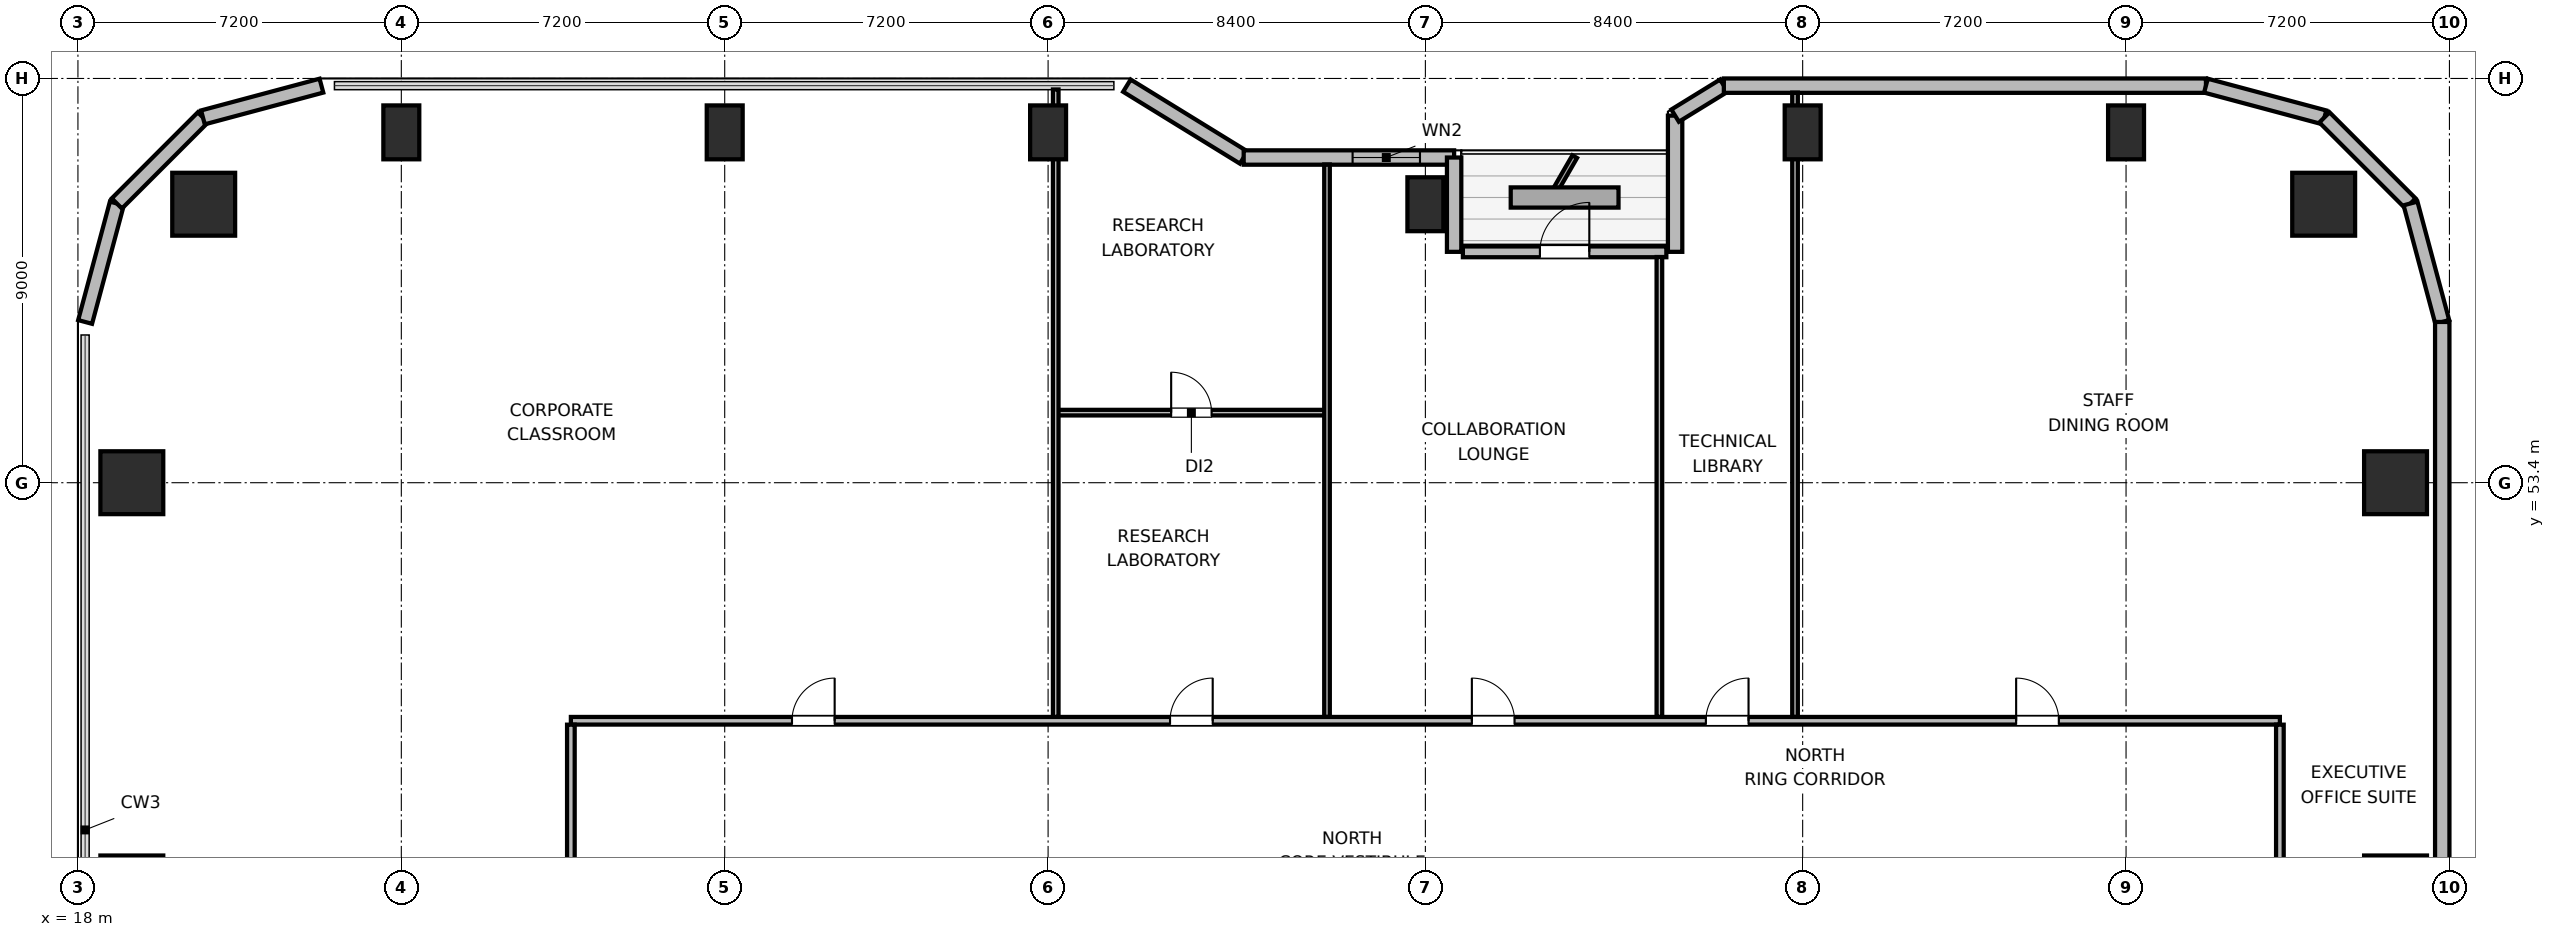
"""IFC4 building model, lengths in metres.
Left out: names, types, materials, properties, quantities, classifications, styles, units other than length and angle.
Written with IfcOpenShell. Run it as: python <this file> out.ifc"""

import sys

from ifc_helpers import new_model, si_unit, direction, frame, frame_2d, origin, origin_2d, place, context, subcontext, project, spatial, rectangle, circle, extrude, element, fill, save


model = new_model("IFC4")
c1 = context("Model", 3, precision=1e-05, world=origin(), true_north=direction((0.0, 1.0)))
c2 = subcontext(c1, "Body", "Model", "MODEL_VIEW")
j1 = project(units=[si_unit("LENGTHUNIT", "METRE"), si_unit("PLANEANGLEUNIT", "RADIAN")], contexts=[c1])
p1 = place(None, origin())
s1 = spatial("IfcSite", under=j1, at=p1, CompositionType="ELEMENT")
p2 = place(p1, origin())
s2 = spatial("IfcBuilding", under=s1, at=p2, CompositionType="ELEMENT")
p3 = place(p2, frame((0.0, 0.0, 105.3)))
s3 = spatial("IfcBuildingStorey", under=s2, at=p3, CompositionType="ELEMENT", Elevation=105.3)
for number, where, z_axis, x_axis in (
    (1, (68.0, 59.6, 0.0), (0.0, 0.0, 1.0), (1.0, 0.0, 0.0)),
    (2, (20.8, 59.6, 0.0), (0.0, 0.0, 1.0), (1.0, 0.0, 0.0)),
):
    element("IfcColumn", number, at=place(p3, frame(where, z_axis=z_axis, x_axis=x_axis)), inside=s3, PredefinedType="COLUMN", context=c2, shape_type="SweptSolid", body=[
        extrude(circle(Radius=0.7, at=origin_2d()), origin(), (0.0, 0.0, 1.0), 3.9),
    ])
for number, where, z_axis, x_axis in (
    (3, (25.2, 61.2, 0.0), (0.0, 0.0, 1.0), (1.0, 0.0, 0.0)),
    (4, (32.4, 61.2, 0.0), (0.0, 0.0, 1.0), (1.0, 0.0, 0.0)),
    (5, (39.6, 61.2, 0.0), (0.0, 0.0, 1.0), (1.0, 0.0, 0.0)),
    (6, (48.0, 59.6, 0.0), (0.0, 0.0, 1.0), (1.0, 0.0, 0.0)),
    (7, (56.4, 61.2, 0.0), (0.0, 0.0, 1.0), (1.0, 0.0, 0.0)),
    (8, (63.6, 61.2, 0.0), (0.0, 0.0, 1.0), (1.0, 0.0, 0.0)),
):
    element("IfcColumn", number, at=place(p3, frame(where, z_axis=z_axis, x_axis=x_axis)), inside=s3, PredefinedType="COLUMN", context=c2, shape_type="SweptSolid", body=[
        extrude(rectangle(XDim=0.8, YDim=1.2, at=origin_2d()), origin(), (0.0, 0.0, 1.0), 3.9),
    ])
for number, where, z_axis, x_axis in (
    (9, (19.2, 44.4, 0.0), (0.0, 0.0, 1.0), (1.0, 0.0, 0.0)),
    (10, (69.6, 44.4, 0.0), (0.0, 0.0, 1.0), (1.0, 0.0, 0.0)),
    (11, (19.2, 53.4, 0.0), (0.0, 0.0, 1.0), (1.0, 0.0, 0.0)),
    (12, (69.6, 53.4, 0.0), (0.0, 0.0, 1.0), (1.0, 0.0, 0.0)),
):
    element("IfcColumn", number, at=place(p3, frame(where, z_axis=z_axis, x_axis=x_axis)), inside=s3, PredefinedType="COLUMN", context=c2, shape_type="SweptSolid", body=[
        extrude(rectangle(XDim=1.4, YDim=1.4, at=origin_2d()), origin(), (0.0, 0.0, 1.0), 3.9),
    ])
p4 = place(p3, frame((18.16, 56.979, 0.0), z_axis=(0.0, 0.0, 1.0), x_axis=(0.25869736047, 0.965958423373, 0.0)))
e13 = element("IfcWall", 13, at=p4, inside=s3, PredefinedType="SOLIDWALL", context=c2, shape_type="SweptSolid", body=[
    extrude(rectangle(XDim=2.731, YDim=0.32, at=frame_2d((1.366, 0.0))), origin(), (0.0, 0.0, 1.0), 3.64),
])
p5 = place(p3, frame((18.866, 59.617, 0.0), z_axis=(0.0, 0.0, 1.0), x_axis=(0.707106781187, 0.707106781187, 0.0)))
e14 = element("IfcWall", 14, at=p5, inside=s3, PredefinedType="SOLIDWALL", context=c2, shape_type="SweptSolid", body=[
    extrude(rectangle(XDim=2.71, YDim=0.32, at=frame_2d((1.355, 0.0))), origin(), (0.0, 0.0, 1.0), 3.64),
])
p6 = place(p3, frame((20.783, 61.533, 0.0), z_axis=(0.0, 0.0, 1.0), x_axis=(0.965964405026, 0.25867502435, 0.0)))
e15 = element("IfcWall", 15, at=p6, inside=s3, PredefinedType="SOLIDWALL", context=c2, shape_type="SweptSolid", body=[
    extrude(rectangle(XDim=2.731, YDim=0.32, at=frame_2d((1.366, 0.0))), origin(), (0.0, 0.0, 1.0), 3.64),
])
p7 = place(p3, frame((41.355, 62.24, 0.0), z_axis=(0.0, 0.0, 1.0), x_axis=(0.851630857047, -0.524142044989, 0.0)))
e16 = element("IfcWall", 16, at=p7, inside=s3, PredefinedType="SOLIDWALL", context=c2, shape_type="SweptSolid", body=[
    extrude(rectangle(XDim=3.053, YDim=0.32, at=frame_2d((1.526, 0.0))), origin(), (0.0, 0.0, 1.0), 2.875),
])
p8 = place(p3, frame((43.955, 60.64, 0.0), z_axis=(0.0, 0.0, 1.0), x_axis=(1.0, 0.0, 0.0)))
e17 = element("IfcWall", 17, at=p8, inside=s3, PredefinedType="SOLIDWALL", context=c2, shape_type="SweptSolid", body=[
    extrude(rectangle(XDim=4.685, YDim=0.32, at=frame_2d((2.343, 0.0))), origin(), (0.0, 0.0, 1.0), 2.875),
])
p9 = place(p8, frame((2.425, 0.0, 0.85)))
e18 = element("IfcOpeningElement", 18, at=p9, cuts=e17, PredefinedType="OPENING", context=c2, shape_type="SweptSolid", body=[
    extrude(rectangle(XDim=1.5, YDim=1.1, at=frame_2d((0.75, 0.55))), frame((0.0, 0.17, 0.0), z_axis=(0.0, -1.0, 0.0), x_axis=(1.0, 0.0, 0.0)), (0.0, 0.0, 1.0), 0.34),
])
p10 = place(p3, frame((48.64, 60.64, 0.0), z_axis=(0.0, 0.0, 1.0), x_axis=(0.0, -1.0, 0.0)))
e19 = element("IfcWall", 19, at=p10, inside=s3, PredefinedType="SOLIDWALL", context=c2, shape_type="SweptSolid", body=[
    extrude(rectangle(XDim=2.1, YDim=0.32, at=frame_2d((1.05, 0.0))), origin(), (0.0, 0.0, 1.0), 2.875),
])
p11 = place(p3, frame((48.835, 58.54, 0.0), z_axis=(0.0, 0.0, 1.0), x_axis=(1.0, 0.0, 0.0)))
e20 = element("IfcWall", 20, at=p11, inside=s3, PredefinedType="SOLIDWALL", context=c2, shape_type="SweptSolid", body=[
    extrude(rectangle(XDim=4.53, YDim=0.24, at=frame_2d((2.265, 0.0))), origin(), (0.0, 0.0, 1.0), 3.64),
])
p12 = place(p11, frame((1.715, 0.0, 0.0)))
e21 = element("IfcOpeningElement", 21, at=p12, cuts=e20, PredefinedType="OPENING", context=c2, shape_type="SweptSolid", body=[
    extrude(rectangle(XDim=1.1, YDim=2.04, at=frame_2d((0.55, 1.02))), frame((0.0, 0.13, 0.0), z_axis=(0.0, -1.0, 0.0), x_axis=(1.0, 0.0, 0.0)), (0.0, 0.0, 1.0), 0.26),
])
p13 = place(p3, frame((53.56, 58.54, 0.0), z_axis=(0.0, 0.0, 1.0), x_axis=(0.0, 1.0, 0.0)))
e22 = element("IfcWall", 22, at=p13, inside=s3, PredefinedType="SOLIDWALL", context=c2, shape_type="SweptSolid", body=[
    extrude(rectangle(XDim=3.032, YDim=0.32, at=frame_2d((1.516, 0.0))), origin(), (0.0, 0.0, 1.0), 2.875),
])
p14 = place(p3, frame((53.56, 61.573, 0.0), z_axis=(0.0, 0.0, 1.0), x_axis=(0.851776724646, 0.523904964045, 0.0)))
e23 = element("IfcWall", 23, at=p14, inside=s3, PredefinedType="SOLIDWALL", context=c2, shape_type="SweptSolid", body=[
    extrude(rectangle(XDim=1.274, YDim=0.32, at=frame_2d((0.637, 0.0))), origin(), (0.0, 0.0, 1.0), 3.64),
])
p15 = place(p3, frame((54.645, 62.24, 0.0), z_axis=(0.0, 0.0, 1.0), x_axis=(1.0, 0.0, 0.0)))
e24 = element("IfcWall", 24, at=p15, inside=s3, PredefinedType="SOLIDWALL", context=c2, shape_type="SweptSolid", body=[
    extrude(rectangle(XDim=10.734, YDim=0.32, at=frame_2d((5.367, 0.0))), origin(), (0.0, 0.0, 1.0), 3.64),
])
p16 = place(p3, frame((65.379, 62.24, 0.0), z_axis=(0.0, 0.0, 1.0), x_axis=(0.965958423373, -0.25869736047, 0.0)))
e25 = element("IfcWall", 25, at=p16, inside=s3, PredefinedType="SOLIDWALL", context=c2, shape_type="SweptSolid", body=[
    extrude(rectangle(XDim=2.731, YDim=0.32, at=frame_2d((1.366, 0.0))), origin(), (0.0, 0.0, 1.0), 3.64),
])
p17 = place(p3, frame((68.017, 61.533, 0.0), z_axis=(0.0, 0.0, 1.0), x_axis=(0.707151821269, -0.707061738235, 0.0)))
e26 = element("IfcWall", 26, at=p17, inside=s3, PredefinedType="SOLIDWALL", context=c2, shape_type="SweptSolid", body=[
    extrude(rectangle(XDim=2.71, YDim=0.32, at=frame_2d((1.355, 0.0))), origin(), (0.0, 0.0, 1.0), 3.64),
])
p18 = place(p3, frame((69.934, 59.617, 0.0), z_axis=(0.0, 0.0, 1.0), x_axis=(0.258613949072, -0.965980758269, 0.0)))
e27 = element("IfcWall", 27, at=p18, inside=s3, PredefinedType="SOLIDWALL", context=c2, shape_type="SweptSolid", body=[
    extrude(rectangle(XDim=2.731, YDim=0.32, at=frame_2d((1.366, 0.0))), origin(), (0.0, 0.0, 1.0), 3.64),
])
p19 = place(p3, frame((70.64, 56.979, 0.0), z_axis=(0.0, 0.0, 1.0), x_axis=(0.0, -1.0, 0.0)))
e28 = element("IfcWall", 28, at=p19, inside=s3, PredefinedType="SOLIDWALL", context=c2, shape_type="SweptSolid", body=[
    extrude(rectangle(XDim=14.219, YDim=0.32, at=frame_2d((7.109, 0.0))), origin(), (0.0, 0.0, 1.0), 3.64),
])
p20 = place(p3, frame((28.975, 48.1, 0.0), z_axis=(0.0, 0.0, 1.0), x_axis=(1.0, 0.0, 0.0)))
e29 = element("IfcWall", 29, at=p20, inside=s3, PredefinedType="PARTITIONING", context=c2, shape_type="SweptSolid", body=[
    extrude(rectangle(XDim=38.05, YDim=0.17, at=frame_2d((19.025, 0.0))), origin(), (0.0, 0.0, 1.0), 3.64),
])
p21 = place(p20, frame((4.923, 0.0, 0.0)))
e30 = element("IfcOpeningElement", 30, at=p21, cuts=e29, PredefinedType="OPENING", context=c2, shape_type="SweptSolid", body=[
    extrude(rectangle(XDim=0.95, YDim=2.04, at=frame_2d((0.475, 1.02))), frame((0.0, 0.095, 0.0), z_axis=(0.0, -1.0, 0.0), x_axis=(1.0, 0.0, 0.0)), (0.0, 0.0, 1.0), 0.19),
])
p22 = place(p20, frame((13.34, 0.0, 0.0)))
e31 = element("IfcOpeningElement", 31, at=p22, cuts=e29, PredefinedType="OPENING", context=c2, shape_type="SweptSolid", body=[
    extrude(rectangle(XDim=0.95, YDim=2.04, at=frame_2d((0.475, 1.02))), frame((0.0, 0.095, 0.0), z_axis=(0.0, -1.0, 0.0), x_axis=(1.0, 0.0, 0.0)), (0.0, 0.0, 1.0), 0.19),
])
p23 = place(p20, frame((20.06, 0.0, 0.0)))
e32 = element("IfcOpeningElement", 32, at=p23, cuts=e29, PredefinedType="OPENING", context=c2, shape_type="SweptSolid", body=[
    extrude(rectangle(XDim=0.95, YDim=2.04, at=frame_2d((0.475, 1.02))), frame((0.0, 0.095, 0.0), z_axis=(0.0, -1.0, 0.0), x_axis=(1.0, 0.0, 0.0)), (0.0, 0.0, 1.0), 0.19),
])
p24 = place(p20, frame((25.27, 0.0, 0.0)))
e33 = element("IfcOpeningElement", 33, at=p24, cuts=e29, PredefinedType="OPENING", context=c2, shape_type="SweptSolid", body=[
    extrude(rectangle(XDim=0.95, YDim=2.04, at=frame_2d((0.475, 1.02))), frame((0.0, 0.095, 0.0), z_axis=(0.0, -1.0, 0.0), x_axis=(1.0, 0.0, 0.0)), (0.0, 0.0, 1.0), 0.19),
])
p25 = place(p20, frame((32.178, 0.0, 0.0)))
e34 = element("IfcOpeningElement", 34, at=p25, cuts=e29, PredefinedType="OPENING", context=c2, shape_type="SweptSolid", body=[
    extrude(rectangle(XDim=0.95, YDim=2.04, at=frame_2d((0.475, 1.02))), frame((0.0, 0.095, 0.0), z_axis=(0.0, -1.0, 0.0), x_axis=(1.0, 0.0, 0.0)), (0.0, 0.0, 1.0), 0.19),
])
p26 = place(p3, frame((28.975, 23.987, 0.0), z_axis=(0.0, 0.0, 1.0), x_axis=(0.0, 1.0, 0.0)))
e35 = element("IfcWall", 35, at=p26, inside=s3, PredefinedType="PARTITIONING", context=c2, shape_type="SweptSolid", body=[
    extrude(rectangle(XDim=24.026, YDim=0.17, at=frame_2d((12.013, 0.0))), origin(), (0.0, 0.0, 1.0), 3.64),
])
p27 = place(p26, frame((11.538, 0.0, 0.0)))
e36 = element("IfcOpeningElement", 36, at=p27, cuts=e35, PredefinedType="OPENING", context=c2, shape_type="SweptSolid", body=[
    extrude(rectangle(XDim=0.95, YDim=2.04, at=frame_2d((0.475, 1.02))), frame((0.0, 0.095, 0.0), z_axis=(0.0, -1.0, 0.0), x_axis=(1.0, 0.0, 0.0)), (0.0, 0.0, 1.0), 0.19),
])
p28 = place(p3, frame((67.025, 23.987, 0.0), z_axis=(0.0, 0.0, 1.0), x_axis=(0.0, 1.0, 0.0)))
e37 = element("IfcWall", 37, at=p28, inside=s3, PredefinedType="PARTITIONING", context=c2, shape_type="SweptSolid", body=[
    extrude(rectangle(XDim=24.026, YDim=0.17, at=frame_2d((12.013, 0.0))), origin(), (0.0, 0.0, 1.0), 3.64),
])
p29 = place(p28, frame((6.088, 0.0, 0.0)))
e38 = element("IfcOpeningElement", 38, at=p29, cuts=e37, PredefinedType="OPENING", context=c2, shape_type="SweptSolid", body=[
    extrude(rectangle(XDim=0.95, YDim=2.04, at=frame_2d((0.475, 1.02))), frame((0.0, 0.095, 0.0), z_axis=(0.0, -1.0, 0.0), x_axis=(1.0, 0.0, 0.0)), (0.0, 0.0, 1.0), 0.19),
])
p30 = place(p28, frame((18.188, 0.0, 0.0)))
e39 = element("IfcOpeningElement", 39, at=p30, cuts=e37, PredefinedType="OPENING", context=c2, shape_type="SweptSolid", body=[
    extrude(rectangle(XDim=0.95, YDim=2.04, at=frame_2d((0.475, 1.02))), frame((0.0, 0.095, 0.0), z_axis=(0.0, -1.0, 0.0), x_axis=(1.0, 0.0, 0.0)), (0.0, 0.0, 1.0), 0.19),
])
p31 = place(p3, frame((39.77, 54.96, 0.0), z_axis=(0.0, 0.0, 1.0), x_axis=(1.0, 0.0, 0.0)))
e40 = element("IfcWall", 40, at=p31, inside=s3, PredefinedType="PARTITIONING", context=c2, shape_type="SweptSolid", body=[
    extrude(rectangle(XDim=6.04, YDim=0.125, at=frame_2d((3.02, 0.0))), origin(), (0.0, 0.0, 1.0), 3.64),
])
p32 = place(p31, frame((2.57, 0.0, 0.0)))
e41 = element("IfcOpeningElement", 41, at=p32, cuts=e40, PredefinedType="OPENING", context=c2, shape_type="SweptSolid", body=[
    extrude(rectangle(XDim=0.9, YDim=2.02, at=frame_2d((0.45, 1.01))), frame((0.0, 0.073, 0.0), z_axis=(0.0, -1.0, 0.0), x_axis=(1.0, 0.0, 0.0)), (0.0, 0.0, 1.0), 0.145),
])
p33 = place(p3, frame((39.77, 48.187, 0.0), z_axis=(0.0, 0.0, 1.0), x_axis=(0.0, 1.0, 0.0)))
e42 = element("IfcWall", 42, at=p33, inside=s3, PredefinedType="PARTITIONING", context=c2, shape_type="SweptSolid", body=[
    extrude(rectangle(XDim=13.968, YDim=0.125, at=frame_2d((6.984, 0.0))), origin(), (0.0, 0.0, 1.0), 3.003),
])
p34 = place(p3, frame((45.81, 48.187, 0.0), z_axis=(0.0, 0.0, 1.0), x_axis=(0.0, 1.0, 0.0)))
e43 = element("IfcWall", 43, at=p34, inside=s3, PredefinedType="PARTITIONING", context=c2, shape_type="SweptSolid", body=[
    extrude(rectangle(XDim=12.298, YDim=0.125, at=frame_2d((6.149, 0.0))), origin(), (0.0, 0.0, 1.0), 3.64),
])
p35 = place(p3, frame((53.21, 48.187, 0.0), z_axis=(0.0, 0.0, 1.0), x_axis=(0.0, 1.0, 0.0)))
e44 = element("IfcWall", 44, at=p35, inside=s3, PredefinedType="PARTITIONING", context=c2, shape_type="SweptSolid", body=[
    extrude(rectangle(XDim=10.238, YDim=0.125, at=frame_2d((5.119, 0.0))), origin(), (0.0, 0.0, 1.0), 3.003),
])
p36 = place(p3, frame((56.23, 48.187, 0.0), z_axis=(0.0, 0.0, 1.0), x_axis=(0.0, 1.0, 0.0)))
e45 = element("IfcWall", 45, at=p36, inside=s3, PredefinedType="PARTITIONING", context=c2, shape_type="SweptSolid", body=[
    extrude(rectangle(XDim=13.898, YDim=0.125, at=frame_2d((6.949, 0.0))), origin(), (0.0, 0.0, 1.0), 3.003),
])
p37 = place(p9, origin())
e46 = element("IfcWindow", 46, at=p37, inside=s3, PartitioningType="SINGLE_PANEL", PredefinedType="WINDOW", context=c2, shape_type="SweptSolid", body=[
    extrude(rectangle(XDim=1.5, YDim=1.1, at=frame_2d((0.75, 0.55))), frame((0.0, 0.03, 0.0), z_axis=(0.0, -1.0, 0.0), x_axis=(1.0, 0.0, 0.0)), (0.0, 0.0, 1.0), 0.06),
])
fill(e18, e46)
p38 = place(p12, origin())
e47 = element("IfcDoor", 47, at=p38, inside=s3, OperationType="SINGLE_SWING_RIGHT", PredefinedType="DOOR", context=c2, shape_type="SweptSolid", body=[
    extrude(rectangle(XDim=1.1, YDim=2.04, at=frame_2d((0.55, 1.02))), frame((0.0, 0.025, 0.0), z_axis=(0.0, -1.0, 0.0), x_axis=(1.0, 0.0, 0.0)), (0.0, 0.0, 1.0), 0.05),
])
fill(e21, e47)
p39 = place(p21, origin())
e48 = element("IfcDoor", 48, at=p39, inside=s3, OperationType="SINGLE_SWING_RIGHT", PredefinedType="DOOR", context=c2, shape_type="SweptSolid", body=[
    extrude(rectangle(XDim=0.95, YDim=2.04, at=frame_2d((0.475, 1.02))), frame((0.0, 0.025, 0.0), z_axis=(0.0, -1.0, 0.0), x_axis=(1.0, 0.0, 0.0)), (0.0, 0.0, 1.0), 0.05),
])
fill(e30, e48)
p40 = place(p32, origin())
e49 = element("IfcDoor", 49, at=p40, inside=s3, OperationType="SINGLE_SWING_LEFT", PredefinedType="DOOR", context=c2, shape_type="SweptSolid", body=[
    extrude(rectangle(XDim=0.9, YDim=2.02, at=frame_2d((0.45, 1.01))), frame((0.0, 0.025, 0.0), z_axis=(0.0, -1.0, 0.0), x_axis=(1.0, 0.0, 0.0)), (0.0, 0.0, 1.0), 0.05),
])
fill(e41, e49)
p41 = place(p22, origin())
e50 = element("IfcDoor", 50, at=p41, inside=s3, OperationType="SINGLE_SWING_RIGHT", PredefinedType="DOOR", context=c2, shape_type="SweptSolid", body=[
    extrude(rectangle(XDim=0.95, YDim=2.04, at=frame_2d((0.475, 1.02))), frame((0.0, 0.025, 0.0), z_axis=(0.0, -1.0, 0.0), x_axis=(1.0, 0.0, 0.0)), (0.0, 0.0, 1.0), 0.05),
])
fill(e31, e50)
p42 = place(p23, origin())
e51 = element("IfcDoor", 51, at=p42, inside=s3, OperationType="SINGLE_SWING_LEFT", PredefinedType="DOOR", context=c2, shape_type="SweptSolid", body=[
    extrude(rectangle(XDim=0.95, YDim=2.04, at=frame_2d((0.475, 1.02))), frame((0.0, 0.025, 0.0), z_axis=(0.0, -1.0, 0.0), x_axis=(1.0, 0.0, 0.0)), (0.0, 0.0, 1.0), 0.05),
])
fill(e32, e51)
p43 = place(p24, origin())
e52 = element("IfcDoor", 52, at=p43, inside=s3, OperationType="SINGLE_SWING_RIGHT", PredefinedType="DOOR", context=c2, shape_type="SweptSolid", body=[
    extrude(rectangle(XDim=0.95, YDim=2.04, at=frame_2d((0.475, 1.02))), frame((0.0, 0.025, 0.0), z_axis=(0.0, -1.0, 0.0), x_axis=(1.0, 0.0, 0.0)), (0.0, 0.0, 1.0), 0.05),
])
fill(e33, e52)
p44 = place(p25, origin())
e53 = element("IfcDoor", 53, at=p44, inside=s3, OperationType="SINGLE_SWING_LEFT", PredefinedType="DOOR", context=c2, shape_type="SweptSolid", body=[
    extrude(rectangle(XDim=0.95, YDim=2.04, at=frame_2d((0.475, 1.02))), frame((0.0, 0.025, 0.0), z_axis=(0.0, -1.0, 0.0), x_axis=(1.0, 0.0, 0.0)), (0.0, 0.0, 1.0), 0.05),
])
fill(e34, e53)
save(model, sys.argv[1])
